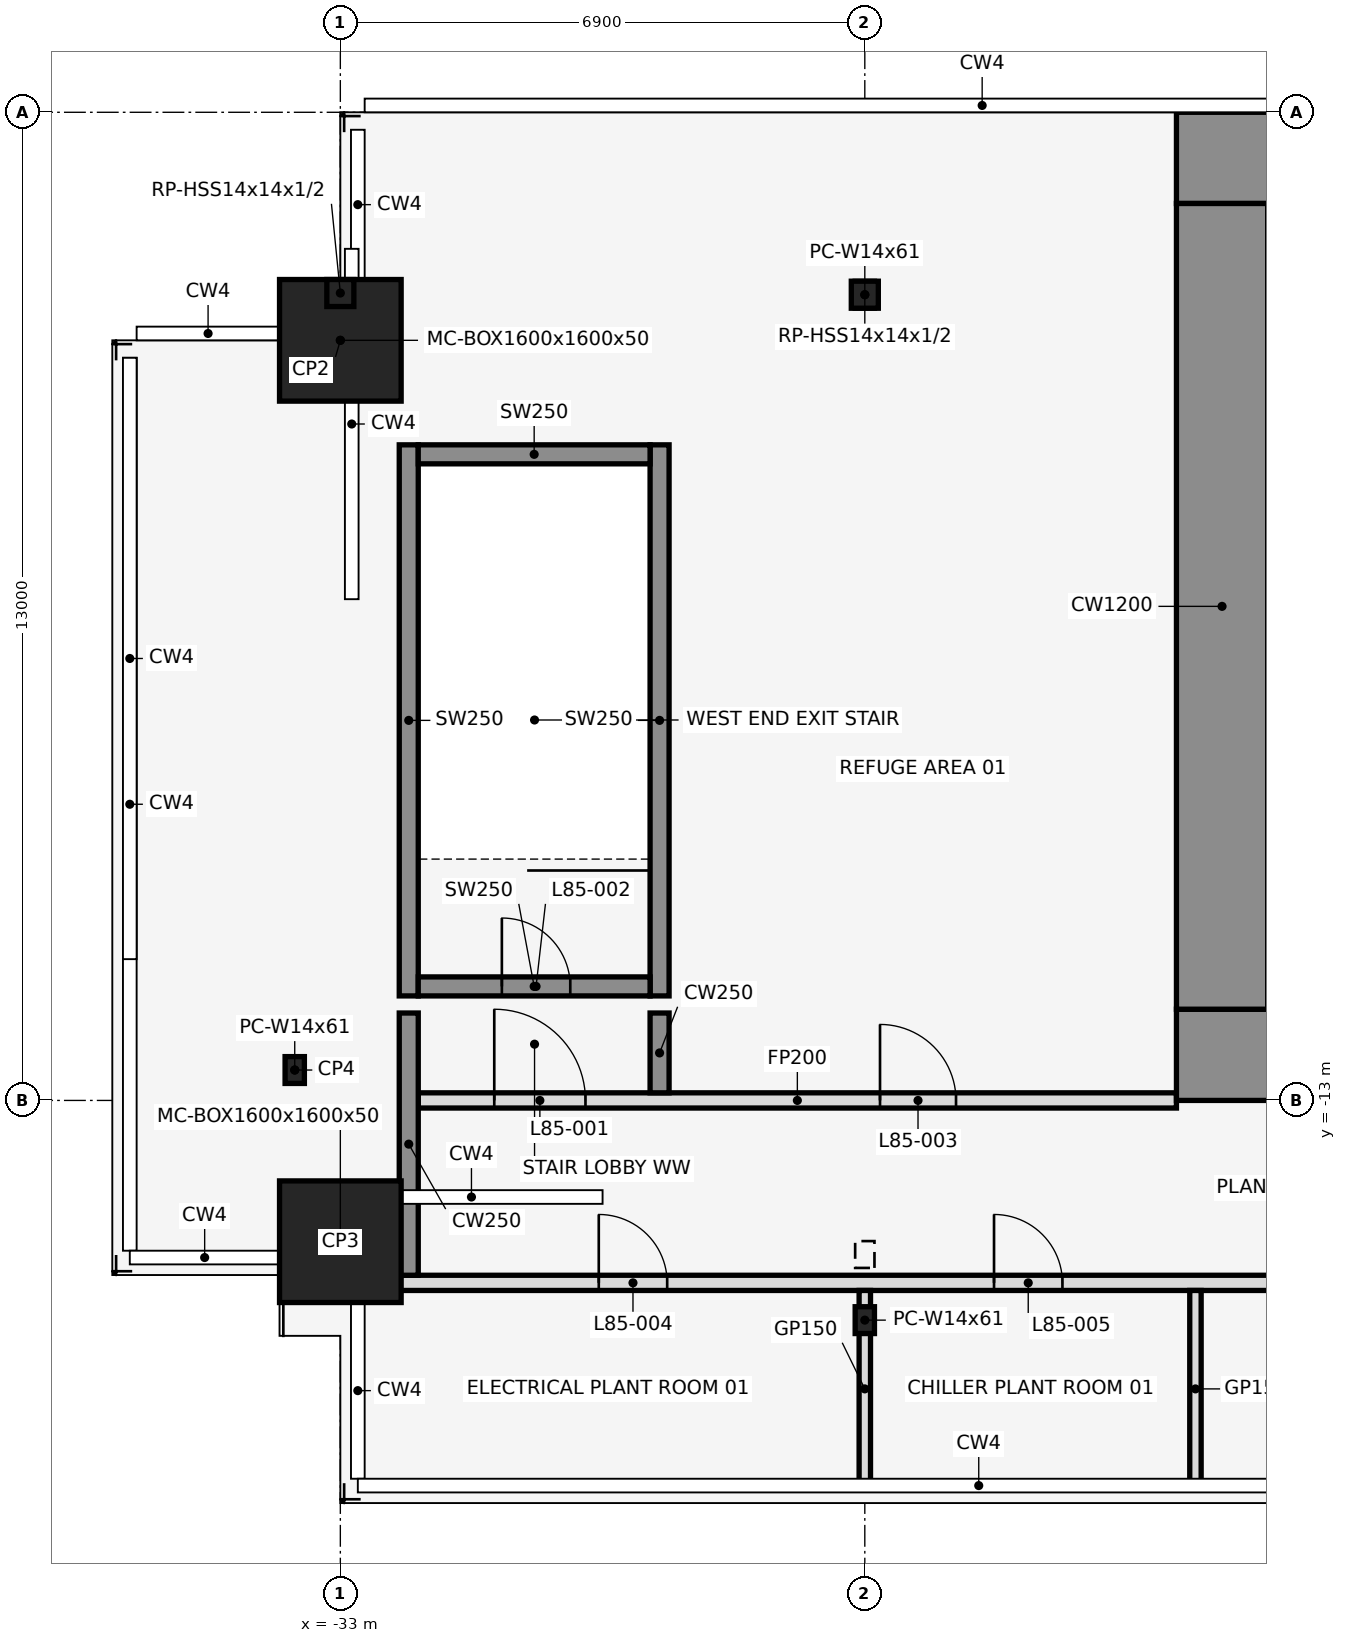
"""IFC4 building model, lengths in metres.
Left out: names, types, materials, properties, quantities, classifications, styles, units other than length and angle.
Written with IfcOpenShell. Run it as: python <this file> out.ifc"""

import sys

from ifc_helpers import new_model, si_unit, direction, frame, frame_2d, origin, origin_2d, place, context, subcontext, project, spatial, rectangle, hollow_rectangle, i_section, extrude, element, fill, save


model = new_model("IFC4")
c1 = context("Model", 3, precision=1e-05, world=origin(), true_north=direction((0.0, 1.0)))
c2 = subcontext(c1, "Body", "Model", "MODEL_VIEW")
j1 = project(units=[si_unit("LENGTHUNIT", "METRE"), si_unit("PLANEANGLEUNIT", "RADIAN")], contexts=[c1])
p1 = place(None, origin())
s1 = spatial("IfcSite", under=j1, at=p1, CompositionType="ELEMENT")
p2 = place(p1, origin())
s2 = spatial("IfcBuilding", under=s1, at=p2, CompositionType="ELEMENT")
p3 = place(p2, frame((0.0, 0.0, 379.4)))
s3 = spatial("IfcBuildingStorey", under=s2, at=p3, CompositionType="ELEMENT", Elevation=379.4)
for number, where, z_axis, x_axis in (
    (1, (-33.0, -14.859, 0.0), (0.0, 0.0, 1.0), (1.0, 0.0, 0.0)),
    (2, (-33.0, -3.0, 0.0), (0.0, 0.0, 1.0), (1.0, 0.0, 0.0)),
):
    element("IfcColumn", number, at=place(p3, frame(where, z_axis=z_axis, x_axis=x_axis)), inside=s3, PredefinedType="COLUMN", context=c2, shape_type="SweptSolid", body=[
        extrude(hollow_rectangle(XDim=1.6, YDim=1.6, WallThickness=0.05, at=origin_2d()), origin(), (0.0, 0.0, 1.0), 4.5),
    ])
p4 = place(p3, frame((-26.1, -15.89, 0.034), z_axis=(0.0, 0.191154699822, 0.981559922132), x_axis=(-1.0, 0.0, 0.0)))
e3 = element("IfcColumn", 3, at=p4, inside=s3, PredefinedType="COLUMN", context=c2, shape_type="SweptSolid", body=[
    extrude(i_section(OverallWidth=0.254, OverallDepth=0.353, WebThickness=0.01, FlangeThickness=0.016, at=origin_2d()), origin(), (0.0, 0.0, 1.0), 4.516),
])
for number, where, z_axis, x_axis in (
    (4, (-26.1, -2.4, 0.0), (0.0, 0.0, 1.0), (1.0, 0.0, 0.0)),
    (5, (-33.6, -12.6, 0.0), (0.0, 0.0, 1.0), (1.0, 0.0, 0.0)),
):
    element("IfcColumn", number, at=place(p3, frame(where, z_axis=z_axis, x_axis=x_axis)), inside=s3, PredefinedType="COLUMN", context=c2, shape_type="SweptSolid", body=[
        extrude(i_section(OverallWidth=0.254, OverallDepth=0.353, WebThickness=0.01, FlangeThickness=0.016, at=origin_2d()), origin(), (0.0, 0.0, 1.0), 4.5),
    ])
p5 = place(p3, frame((-33.0, -2.378, 4.516), z_axis=(0.0, 0.0, 1.0), x_axis=(1.0, 0.0, 0.0)))
e6 = element("IfcColumn", 6, at=p5, inside=s3, PredefinedType="COLUMN", context=c2, shape_type="SweptSolid", body=[
    extrude(hollow_rectangle(XDim=0.356, YDim=0.356, WallThickness=0.012, at=origin_2d()), origin(), (0.0, 0.0, 1.0), 2.417),
])
p6 = place(p3, frame((-26.1, -2.4, 4.5), z_axis=(0.0, 0.0, 1.0), x_axis=(1.0, 0.0, 0.0)))
e7 = element("IfcColumn", 7, at=p6, inside=s3, PredefinedType="COLUMN", context=c2, shape_type="SweptSolid", body=[
    extrude(hollow_rectangle(XDim=0.356, YDim=0.356, WallThickness=0.012, at=origin_2d()), origin(), (0.0, 0.0, 1.0), 2.433),
])
for number, where, z_axis, x_axis in (
    (8, (-32.1, -11.625, 0.0), (0.0, 0.0, 1.0), (0.0, 1.0, 0.0)),
    (9, (-28.8, -11.625, 0.0), (0.0, 0.0, 1.0), (0.0, 1.0, 0.0)),
):
    element("IfcWall", number, at=place(p3, frame(where, z_axis=z_axis, x_axis=x_axis)), inside=s3, PredefinedType="SHEAR", context=c2, shape_type="SweptSolid", body=[
        extrude(rectangle(XDim=7.25, YDim=0.25, at=frame_2d((3.625, 0.0))), origin(), (0.0, 0.0, 1.0), 4.5),
    ])
p7 = place(p3, frame((-31.975, -11.5, 0.0), z_axis=(0.0, 0.0, 1.0), x_axis=(1.0, 0.0, 0.0)))
e10 = element("IfcWall", 10, at=p7, inside=s3, PredefinedType="SHEAR", context=c2, shape_type="SweptSolid", body=[
    extrude(rectangle(XDim=3.05, YDim=0.25, at=frame_2d((1.525, 0.0))), origin(), (0.0, 0.0, 1.0), 4.5),
])
p8 = place(p7, frame((1.1, 0.0, 0.0)))
e11 = element("IfcOpeningElement", 11, at=p8, cuts=e10, PredefinedType="OPENING", context=c2, shape_type="SweptSolid", body=[
    extrude(rectangle(XDim=0.9, YDim=2.1, at=frame_2d((0.45, 1.05))), frame((0.0, 0.137, 0.0), z_axis=(0.0, -1.0, 0.0), x_axis=(1.0, 0.0, 0.0)), (0.0, 0.0, 1.0), 0.274),
])
p9 = place(p3, frame((-31.975, -4.5, 0.0), z_axis=(0.0, 0.0, 1.0), x_axis=(1.0, 0.0, 0.0)))
e12 = element("IfcWall", 12, at=p9, inside=s3, PredefinedType="SHEAR", context=c2, shape_type="SweptSolid", body=[
    extrude(rectangle(XDim=3.05, YDim=0.25, at=frame_2d((1.525, 0.0))), origin(), (0.0, 0.0, 1.0), 4.5),
])
p10 = place(p3, frame((-32.225, -15.4, 0.0), z_axis=(0.0, 0.0, 1.0), x_axis=(1.0, 0.0, 0.0)))
e13 = element("IfcWall", 13, at=p10, inside=s3, PredefinedType="PARTITIONING", context=c2, shape_type="SweptSolid", body=[
    extrude(rectangle(XDim=23.925, YDim=0.2, at=frame_2d((11.962, 0.0))), origin(), (0.0, 0.0, 1.0), 3.78),
])
p11 = place(p10, frame((2.625, 0.0, 0.0)))
e14 = element("IfcOpeningElement", 14, at=p11, cuts=e13, PredefinedType="OPENING", context=c2, shape_type="SweptSolid", body=[
    extrude(rectangle(XDim=0.9, YDim=2.1, at=frame_2d((0.45, 1.05))), frame((0.0, 0.112, 0.0), z_axis=(0.0, -1.0, 0.0), x_axis=(1.0, 0.0, 0.0)), (0.0, 0.0, 1.0), 0.224),
])
p12 = place(p10, frame((7.825, 0.0, 0.0)))
e15 = element("IfcOpeningElement", 15, at=p12, cuts=e13, PredefinedType="OPENING", context=c2, shape_type="SweptSolid", body=[
    extrude(rectangle(XDim=0.9, YDim=2.1, at=frame_2d((0.45, 1.05))), frame((0.0, 0.112, 0.0), z_axis=(0.0, -1.0, 0.0), x_axis=(1.0, 0.0, 0.0)), (0.0, 0.0, 1.0), 0.224),
])
p13 = place(p10, frame((12.575, 0.0, 0.0)))
e16 = element("IfcOpeningElement", 16, at=p13, cuts=e13, PredefinedType="OPENING", context=c2, shape_type="SweptSolid", body=[
    extrude(rectangle(XDim=1.0, YDim=2.1, at=frame_2d((0.5, 1.05))), frame((0.0, 0.112, 0.0), z_axis=(0.0, -1.0, 0.0), x_axis=(1.0, 0.0, 0.0)), (0.0, 0.0, 1.0), 0.224),
])
p14 = place(p3, frame((-31.975, -13.0, 0.0), z_axis=(0.0, 0.0, 1.0), x_axis=(1.0, 0.0, 0.0)))
e17 = element("IfcWall", 17, at=p14, inside=s3, PredefinedType="PARTITIONING", context=c2, shape_type="SweptSolid", body=[
    extrude(rectangle(XDim=9.975, YDim=0.2, at=frame_2d((4.988, 0.0))), origin(), (0.0, 0.0, 1.0), 3.78),
])
p15 = place(p14, frame((1.0, 0.0, 0.0)))
e18 = element("IfcOpeningElement", 18, at=p15, cuts=e17, PredefinedType="OPENING", context=c2, shape_type="SweptSolid", body=[
    extrude(rectangle(XDim=1.2, YDim=2.1, at=frame_2d((0.6, 1.05))), frame((0.0, 0.112, 0.0), z_axis=(0.0, -1.0, 0.0), x_axis=(1.0, 0.0, 0.0)), (0.0, 0.0, 1.0), 0.224),
])
p16 = place(p14, frame((6.075, 0.0, 0.0)))
e19 = element("IfcOpeningElement", 19, at=p16, cuts=e17, PredefinedType="OPENING", context=c2, shape_type="SweptSolid", body=[
    extrude(rectangle(XDim=1.0, YDim=2.1, at=frame_2d((0.5, 1.05))), frame((0.0, 0.112, 0.0), z_axis=(0.0, -1.0, 0.0), x_axis=(1.0, 0.0, 0.0)), (0.0, 0.0, 1.0), 0.224),
])
p17 = place(p3, frame((-32.1, -15.3, 0.0), z_axis=(0.0, 0.0, 1.0), x_axis=(0.0, 1.0, 0.0)))
e20 = element("IfcWall", 20, at=p17, inside=s3, PredefinedType="SHEAR", context=c2, shape_type="SweptSolid", body=[
    extrude(rectangle(XDim=3.45, YDim=0.25, at=frame_2d((1.725, 0.0))), origin(), (0.0, 0.0, 1.0), 4.5),
])
p18 = place(p3, frame((-28.8, -12.9, 0.0), z_axis=(0.0, 0.0, 1.0), x_axis=(0.0, 1.0, 0.0)))
e21 = element("IfcWall", 21, at=p18, inside=s3, PredefinedType="SHEAR", context=c2, shape_type="SweptSolid", body=[
    extrude(rectangle(XDim=1.05, YDim=0.25, at=frame_2d((0.525, 0.0))), origin(), (0.0, 0.0, 1.0), 4.5),
])
for number, where, z_axis, x_axis in (
    (22, (-26.1, -18.09, 0.0), (0.0, 0.0, 1.0), (0.0, 1.0, 0.0)),
    (23, (-21.75, -18.09, 0.0), (0.0, 0.0, 1.0), (0.0, 1.0, 0.0)),
):
    element("IfcWall", number, at=place(p3, frame(where, z_axis=z_axis, x_axis=x_axis)), inside=s3, PredefinedType="PARTITIONING", context=c2, shape_type="SweptSolid", body=[
        extrude(rectangle(XDim=2.59, YDim=0.15, at=frame_2d((1.295, 0.0))), origin(), (0.0, 0.0, 1.0), 3.78),
    ])
p19 = place(p3, frame((-22.0, -0.6, 0.0), z_axis=(0.0, 0.0, 1.0), x_axis=(1.0, 0.0, 0.0)))
e24 = element("IfcWall", 24, at=p19, inside=s3, PredefinedType="SHEAR", context=c2, shape_type="SweptSolid", body=[
    extrude(rectangle(XDim=13.7, YDim=1.2, at=frame_2d((6.85, 0.0))), origin(), (0.0, 0.0, 1.0), 4.5),
])
p20 = place(p3, frame((-22.0, -12.4, 0.0), z_axis=(0.0, 0.0, 1.0), x_axis=(1.0, 0.0, 0.0)))
e25 = element("IfcWall", 25, at=p20, inside=s3, PredefinedType="SHEAR", context=c2, shape_type="SweptSolid", body=[
    extrude(rectangle(XDim=13.7, YDim=1.2, at=frame_2d((6.85, 0.0))), origin(), (0.0, 0.0, 1.0), 4.5),
])
p21 = place(p20, frame((2.2, 0.0, 0.0)))
e26 = element("IfcOpeningElement", 26, at=p21, cuts=e25, PredefinedType="OPENING", context=c2, shape_type="SweptSolid", body=[
    extrude(rectangle(XDim=1.2, YDim=2.1, at=frame_2d((0.6, 1.05))), frame((0.0, 0.612, 0.0), z_axis=(0.0, -1.0, 0.0), x_axis=(1.0, 0.0, 0.0)), (0.0, 0.0, 1.0), 1.224),
])
p22 = place(p20, frame((10.75, 0.0, 0.0)))
e27 = element("IfcOpeningElement", 27, at=p22, cuts=e25, PredefinedType="OPENING", context=c2, shape_type="SweptSolid", body=[
    extrude(rectangle(XDim=1.2, YDim=2.1, at=frame_2d((0.6, 1.05))), frame((0.0, 0.612, 0.0), z_axis=(0.0, -1.0, 0.0), x_axis=(1.0, 0.0, 0.0)), (0.0, 0.0, 1.0), 1.224),
])
p23 = place(p20, frame((6.3, 0.0, 0.0)))
e28 = element("IfcOpeningElement", 28, at=p23, cuts=e25, PredefinedType="OPENING", context=c2, shape_type="SweptSolid", body=[
    extrude(rectangle(XDim=1.2, YDim=2.1, at=frame_2d((0.6, 1.05))), frame((0.0, 0.612, 0.0), z_axis=(0.0, -1.0, 0.0), x_axis=(1.0, 0.0, 0.0)), (0.0, 0.0, 1.0), 1.224),
])
p24 = place(p3, frame((-21.4, -11.8, 0.0), z_axis=(0.0, 0.0, 1.0), x_axis=(0.0, 1.0, 0.0)))
e29 = element("IfcWall", 29, at=p24, inside=s3, PredefinedType="SHEAR", context=c2, shape_type="SweptSolid", body=[
    extrude(rectangle(XDim=10.6, YDim=1.2, at=frame_2d((5.3, 0.0))), origin(), (0.0, 0.0, 1.0), 4.5),
])
p25 = place(p15, origin())
e30 = element("IfcDoor", 30, at=p25, inside=s3, OperationType="SINGLE_SWING_LEFT", PredefinedType="DOOR", context=c2, shape_type="SweptSolid", body=[
    extrude(rectangle(XDim=1.2, YDim=2.1, at=frame_2d((0.6, 1.05))), frame((0.0, 0.025, 0.0), z_axis=(0.0, -1.0, 0.0), x_axis=(1.0, 0.0, 0.0)), (0.0, 0.0, 1.0), 0.05),
])
fill(e18, e30)
p26 = place(p8, origin())
e31 = element("IfcDoor", 31, at=p26, inside=s3, OperationType="SINGLE_SWING_LEFT", PredefinedType="DOOR", context=c2, shape_type="SweptSolid", body=[
    extrude(rectangle(XDim=0.9, YDim=2.1, at=frame_2d((0.45, 1.05))), frame((0.0, 0.025, 0.0), z_axis=(0.0, -1.0, 0.0), x_axis=(1.0, 0.0, 0.0)), (0.0, 0.0, 1.0), 0.05),
])
fill(e11, e31)
p27 = place(p16, origin())
e32 = element("IfcDoor", 32, at=p27, inside=s3, OperationType="SINGLE_SWING_RIGHT", PredefinedType="DOOR", context=c2, shape_type="SweptSolid", body=[
    extrude(rectangle(XDim=1.0, YDim=2.1, at=frame_2d((0.5, 1.05))), frame((0.0, 0.025, 0.0), z_axis=(0.0, -1.0, 0.0), x_axis=(1.0, 0.0, 0.0)), (0.0, 0.0, 1.0), 0.05),
])
fill(e19, e32)
p28 = place(p11, frame((0.9, 0.0, 0.0), z_axis=(0.0, 0.0, 1.0), x_axis=(-1.0, 0.0, 0.0)))
e33 = element("IfcDoor", 33, at=p28, inside=s3, OperationType="SINGLE_SWING_LEFT", PredefinedType="DOOR", context=c2, shape_type="SweptSolid", body=[
    extrude(rectangle(XDim=0.9, YDim=2.1, at=frame_2d((0.45, 1.05))), frame((0.0, 0.025, 0.0), z_axis=(0.0, -1.0, 0.0), x_axis=(1.0, 0.0, 0.0)), (0.0, 0.0, 1.0), 0.05),
])
fill(e14, e33)
p29 = place(p12, frame((0.9, 0.0, 0.0), z_axis=(0.0, 0.0, 1.0), x_axis=(-1.0, 0.0, 0.0)))
e34 = element("IfcDoor", 34, at=p29, inside=s3, OperationType="SINGLE_SWING_RIGHT", PredefinedType="DOOR", context=c2, shape_type="SweptSolid", body=[
    extrude(rectangle(XDim=0.9, YDim=2.1, at=frame_2d((0.45, 1.05))), frame((0.0, 0.025, 0.0), z_axis=(0.0, -1.0, 0.0), x_axis=(1.0, 0.0, 0.0)), (0.0, 0.0, 1.0), 0.05),
])
fill(e15, e34)
save(model, sys.argv[1])
